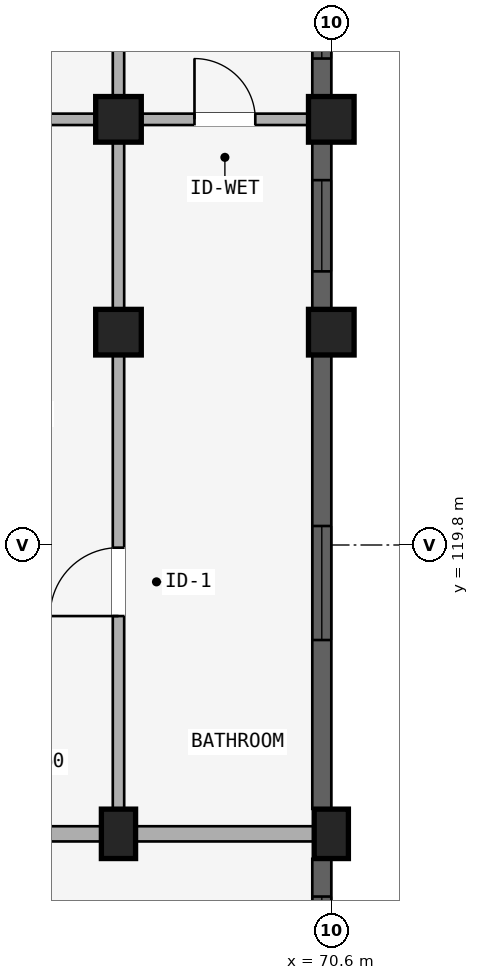
"""IFC4 building model, lengths in metres.
Left out: names, types, materials, properties, quantities, classifications, styles, units other than length and angle.
Written with IfcOpenShell. Run it as: python <this file> out.ifc"""

import sys

from ifc_helpers import new_model, si_unit, direction, frame, frame_2d, origin, origin_2d, place, context, subcontext, project, spatial, rectangle, extrude, element, fill, save


model = new_model("IFC4")
c1 = context("Model", 3, precision=1e-05, world=origin(), true_north=direction((0.0, 1.0)))
c2 = subcontext(c1, "Body", "Model", "MODEL_VIEW")
j1 = project(units=[si_unit("LENGTHUNIT", "METRE"), si_unit("PLANEANGLEUNIT", "RADIAN")], contexts=[c1])
p1 = place(None, origin())
s1 = spatial("IfcSite", under=j1, at=p1, CompositionType="ELEMENT")
p2 = place(p1, origin())
s2 = spatial("IfcBuilding", under=s1, at=p2, CompositionType="ELEMENT")
p3 = place(p2, frame((0.0, 0.0, 33.9)))
s3 = spatial("IfcBuildingStorey", under=s2, at=p3, CompositionType="ELEMENT", Elevation=33.9)
p4 = place(p3, frame((67.8, 116.0, 0.0), z_axis=(0.0, 0.0, 1.0), x_axis=(1.0, 0.0, 0.0)))
e1 = element("IfcColumn", 1, at=p4, inside=s3, PredefinedType="COLUMN", context=c2, shape_type="SweptSolid", body=[
    extrude(rectangle(XDim=0.45, YDim=0.65, at=origin_2d()), origin(), (0.0, 0.0, 1.0), 2.93),
])
for number, where, z_axis, x_axis in (
    (2, (67.8, 122.6, 0.0), (0.0, 0.0, 1.0), (1.0, 0.0, 0.0)),
    (3, (67.8, 125.4, 0.0), (0.0, 0.0, 1.0), (1.0, 0.0, 0.0)),
):
    element("IfcColumn", number, at=place(p3, frame(where, z_axis=z_axis, x_axis=x_axis)), inside=s3, PredefinedType="COLUMN", context=c2, shape_type="SweptSolid", body=[
        extrude(rectangle(XDim=0.6, YDim=0.6, at=origin_2d()), origin(), (0.0, 0.0, 1.0), 2.93),
    ])
p5 = place(p3, frame((70.6, 116.0, 0.0), z_axis=(0.0, 0.0, 1.0), x_axis=(1.0, 0.0, 0.0)))
e4 = element("IfcColumn", 4, at=p5, inside=s3, PredefinedType="COLUMN", context=c2, shape_type="SweptSolid", body=[
    extrude(rectangle(XDim=0.45, YDim=0.65, at=origin_2d()), origin(), (0.0, 0.0, 1.0), 2.93),
])
for number, where, z_axis, x_axis in (
    (5, (70.6, 122.6, 0.0), (0.0, 0.0, 1.0), (1.0, 0.0, 0.0)),
    (6, (70.6, 125.4, 0.0), (0.0, 0.0, 1.0), (1.0, 0.0, 0.0)),
):
    element("IfcColumn", number, at=place(p3, frame(where, z_axis=z_axis, x_axis=x_axis)), inside=s3, PredefinedType="COLUMN", context=c2, shape_type="SweptSolid", body=[
        extrude(rectangle(XDim=0.6, YDim=0.6, at=origin_2d()), origin(), (0.0, 0.0, 1.0), 2.93),
    ])
p6 = place(p3, frame((65.0, 116.0, 0.0), z_axis=(0.0, 0.0, 1.0), x_axis=(1.0, 0.0, 0.0)))
e7 = element("IfcWall", 7, at=p6, inside=s3, PredefinedType="STANDARD", context=c2, shape_type="SweptSolid", body=[
    extrude(rectangle(XDim=2.8, YDim=0.2, at=frame_2d((1.4, 0.0))), origin(), (0.0, 0.0, 1.0), 2.372),
])
p7 = place(p6, frame((0.9, 0.0, 0.0)))
e8 = element("IfcOpeningElement", 8, at=p7, cuts=e7, PredefinedType="OPENING", context=c2, shape_type="SweptSolid", body=[
    extrude(rectangle(XDim=1.0, YDim=2.15, at=frame_2d((0.5, 1.075))), frame((0.0, 0.11, 0.0), z_axis=(0.0, -1.0, 0.0), x_axis=(1.0, 0.0, 0.0)), (0.0, 0.0, 1.0), 0.22),
])
p8 = place(p3, frame((65.08, 125.4, 0.0), z_axis=(0.0, 0.0, 1.0), x_axis=(1.0, 0.0, 0.0)))
e9 = element("IfcWall", 9, at=p8, inside=s3, PredefinedType="PLUMBINGWALL", context=c2, shape_type="SweptSolid", body=[
    extrude(rectangle(XDim=2.64, YDim=0.15, at=frame_2d((1.32, 0.0))), origin(), (0.0, 0.0, 1.0), 2.372),
])
p9 = place(p8, frame((0.87, 0.0, 0.0)))
e10 = element("IfcOpeningElement", 10, at=p9, cuts=e9, PredefinedType="OPENING", context=c2, shape_type="SweptSolid", body=[
    extrude(rectangle(XDim=0.9, YDim=2.1, at=frame_2d((0.45, 1.05))), frame((0.0, 0.085, 0.0), z_axis=(0.0, -1.0, 0.0), x_axis=(1.0, 0.0, 0.0)), (0.0, 0.0, 1.0), 0.17),
])
p10 = place(p3, frame((67.8, 116.0, 0.0), z_axis=(0.0, 0.0, 1.0), x_axis=(1.0, 0.0, 0.0)))
e11 = element("IfcWall", 11, at=p10, inside=s3, PredefinedType="STANDARD", context=c2, shape_type="SweptSolid", body=[
    extrude(rectangle(XDim=2.8, YDim=0.2, at=frame_2d((1.4, 0.0))), origin(), (0.0, 0.0, 1.0), 2.372),
])
p11 = place(p3, frame((67.88, 125.4, 0.0), z_axis=(0.0, 0.0, 1.0), x_axis=(1.0, 0.0, 0.0)))
e12 = element("IfcWall", 12, at=p11, inside=s3, PredefinedType="PLUMBINGWALL", context=c2, shape_type="SweptSolid", body=[
    extrude(rectangle(XDim=2.64, YDim=0.15, at=frame_2d((1.32, 0.0))), origin(), (0.0, 0.0, 1.0), 2.372),
])
p12 = place(p11, frame((0.92, 0.0, 0.0)))
e13 = element("IfcOpeningElement", 13, at=p12, cuts=e12, PredefinedType="OPENING", context=c2, shape_type="SweptSolid", body=[
    extrude(rectangle(XDim=0.8, YDim=2.1, at=frame_2d((0.4, 1.05))), frame((0.0, 0.085, 0.0), z_axis=(0.0, -1.0, 0.0), x_axis=(1.0, 0.0, 0.0)), (0.0, 0.0, 1.0), 0.17),
])
p13 = place(p3, frame((67.8, 116.05, 0.0), z_axis=(0.0, 0.0, 1.0), x_axis=(0.0, 1.0, 0.0)))
e14 = element("IfcWall", 14, at=p13, inside=s3, PredefinedType="PARTITIONING", context=c2, shape_type="SweptSolid", body=[
    extrude(rectangle(XDim=6.53, YDim=0.15, at=frame_2d((3.265, 0.0))), origin(), (0.0, 0.0, 1.0), 2.372),
])
p14 = place(p13, frame((2.815, 0.0, 0.0)))
e15 = element("IfcOpeningElement", 15, at=p14, cuts=e14, PredefinedType="OPENING", context=c2, shape_type="SweptSolid", body=[
    extrude(rectangle(XDim=0.9, YDim=2.1, at=frame_2d((0.45, 1.05))), frame((0.0, 0.085, 0.0), z_axis=(0.0, -1.0, 0.0), x_axis=(1.0, 0.0, 0.0)), (0.0, 0.0, 1.0), 0.17),
])
p15 = place(p3, frame((67.8, 122.7, 0.0), z_axis=(0.0, 0.0, 1.0), x_axis=(0.0, 1.0, 0.0)))
e16 = element("IfcWall", 16, at=p15, inside=s3, PredefinedType="PARTITIONING", context=c2, shape_type="SweptSolid", body=[
    extrude(rectangle(XDim=10.82, YDim=0.15, at=frame_2d((5.41, 0.0))), origin(), (0.0, 0.0, 1.0), 2.372),
])
p16 = place(p15, frame((3.7, 0.0, 0.0)))
e17 = element("IfcOpeningElement", 17, at=p16, cuts=e16, PredefinedType="OPENING", context=c2, shape_type="SweptSolid", body=[
    extrude(rectangle(XDim=0.8, YDim=2.1, at=frame_2d((0.4, 1.05))), frame((0.0, 0.085, 0.0), z_axis=(0.0, -1.0, 0.0), x_axis=(1.0, 0.0, 0.0)), (0.0, 0.0, 1.0), 0.17),
])
p17 = place(p3, frame((70.475, 113.928, 0.0), z_axis=(0.0, 0.0, 1.0), x_axis=(0.0, 1.0, 0.0)))
e18 = element("IfcWall", 18, at=p17, inside=s3, PredefinedType="STANDARD", context=c2, shape_type="SweptSolid", body=[
    extrude(rectangle(XDim=1.743, YDim=0.25, at=frame_2d((0.872, 0.0))), origin(), (0.0, 0.0, 1.0), 2.372),
])
p18 = place(p17, frame((0.497, 0.0, 0.88)))
e19 = element("IfcOpeningElement", 19, at=p18, cuts=e18, PredefinedType="OPENING", context=c2, shape_type="SweptSolid", body=[
    extrude(rectangle(XDim=0.75, YDim=1.05, at=frame_2d((0.375, 0.525))), frame((0.0, 0.135, 0.0), z_axis=(0.0, -1.0, 0.0), x_axis=(1.0, 0.0, 0.0)), (0.0, 0.0, 1.0), 0.27),
])
p19 = place(p3, frame((70.475, 116.329, 0.0), z_axis=(0.0, 0.0, 1.0), x_axis=(0.0, 1.0, 0.0)))
e20 = element("IfcWall", 20, at=p19, inside=s3, PredefinedType="STANDARD", context=c2, shape_type="SweptSolid", body=[
    extrude(rectangle(XDim=5.968, YDim=0.25, at=frame_2d((2.984, 0.0))), origin(), (0.0, 0.0, 1.0), 2.372),
])
p20 = place(p19, frame((2.221, 0.0, 0.522)))
e21 = element("IfcOpeningElement", 21, at=p20, cuts=e20, PredefinedType="OPENING", context=c2, shape_type="SweptSolid", body=[
    extrude(rectangle(XDim=1.5, YDim=1.65, at=frame_2d((0.75, 0.825))), frame((0.0, 0.135, 0.0), z_axis=(0.0, -1.0, 0.0), x_axis=(1.0, 0.0, 0.0)), (0.0, 0.0, 1.0), 0.27),
])
p21 = place(p3, frame((70.475, 122.904, 0.0), z_axis=(0.0, 0.0, 1.0), x_axis=(0.0, 1.0, 0.0)))
e22 = element("IfcWall", 22, at=p21, inside=s3, PredefinedType="STANDARD", context=c2, shape_type="SweptSolid", body=[
    extrude(rectangle(XDim=2.193, YDim=0.25, at=frame_2d((1.096, 0.0))), origin(), (0.0, 0.0, 1.0), 2.372),
])
p22 = place(p21, frame((0.497, 0.0, 0.672)))
e23 = element("IfcOpeningElement", 23, at=p22, cuts=e22, PredefinedType="OPENING", context=c2, shape_type="SweptSolid", body=[
    extrude(rectangle(XDim=1.2, YDim=1.5, at=frame_2d((0.6, 0.75))), frame((0.0, 0.135, 0.0), z_axis=(0.0, -1.0, 0.0), x_axis=(1.0, 0.0, 0.0)), (0.0, 0.0, 1.0), 0.27),
])
p23 = place(p3, frame((70.475, 125.704, 0.0), z_axis=(0.0, 0.0, 1.0), x_axis=(0.0, 1.0, 0.0)))
e24 = element("IfcWall", 24, at=p23, inside=s3, PredefinedType="STANDARD", context=c2, shape_type="SweptSolid", body=[
    extrude(rectangle(XDim=2.193, YDim=0.25, at=frame_2d((1.096, 0.0))), origin(), (0.0, 0.0, 1.0), 2.372),
])
p24 = place(p23, frame((0.497, 0.0, 0.672)))
e25 = element("IfcOpeningElement", 25, at=p24, cuts=e24, PredefinedType="OPENING", context=c2, shape_type="SweptSolid", body=[
    extrude(rectangle(XDim=1.2, YDim=1.5, at=frame_2d((0.6, 0.75))), frame((0.0, 0.135, 0.0), z_axis=(0.0, -1.0, 0.0), x_axis=(1.0, 0.0, 0.0)), (0.0, 0.0, 1.0), 0.27),
])
p25 = place(p18, origin())
e26 = element("IfcWindow", 26, at=p25, inside=s3, PartitioningType="SINGLE_PANEL", PredefinedType="WINDOW", context=c2, shape_type="SweptSolid", body=[
    extrude(rectangle(XDim=0.75, YDim=1.05, at=frame_2d((0.375, 0.525))), frame((0.0, 0.03, 0.0), z_axis=(0.0, -1.0, 0.0), x_axis=(1.0, 0.0, 0.0)), (0.0, 0.0, 1.0), 0.06),
])
fill(e19, e26)
p26 = place(p20, origin())
e27 = element("IfcWindow", 27, at=p26, inside=s3, PartitioningType="DOUBLE_PANEL_VERTICAL", PredefinedType="WINDOW", context=c2, shape_type="SweptSolid", body=[
    extrude(rectangle(XDim=1.5, YDim=1.65, at=frame_2d((0.75, 0.825))), frame((0.0, 0.03, 0.0), z_axis=(0.0, -1.0, 0.0), x_axis=(1.0, 0.0, 0.0)), (0.0, 0.0, 1.0), 0.06),
])
fill(e21, e27)
p27 = place(p22, origin())
e28 = element("IfcWindow", 28, at=p27, inside=s3, PartitioningType="SINGLE_PANEL", PredefinedType="WINDOW", context=c2, shape_type="SweptSolid", body=[
    extrude(rectangle(XDim=1.2, YDim=1.5, at=frame_2d((0.6, 0.75))), frame((0.0, 0.03, 0.0), z_axis=(0.0, -1.0, 0.0), x_axis=(1.0, 0.0, 0.0)), (0.0, 0.0, 1.0), 0.06),
])
fill(e23, e28)
p28 = place(p24, origin())
e29 = element("IfcWindow", 29, at=p28, inside=s3, PartitioningType="SINGLE_PANEL", PredefinedType="WINDOW", context=c2, shape_type="SweptSolid", body=[
    extrude(rectangle(XDim=1.2, YDim=1.5, at=frame_2d((0.6, 0.75))), frame((0.0, 0.03, 0.0), z_axis=(0.0, -1.0, 0.0), x_axis=(1.0, 0.0, 0.0)), (0.0, 0.0, 1.0), 0.06),
])
fill(e25, e29)
p29 = place(p12, origin())
e30 = element("IfcDoor", 30, at=p29, inside=s3, OperationType="SINGLE_SWING_LEFT", PredefinedType="DOOR", context=c2, shape_type="SweptSolid", body=[
    extrude(rectangle(XDim=0.8, YDim=2.1, at=frame_2d((0.4, 1.05))), frame((0.0, 0.025, 0.0), z_axis=(0.0, -1.0, 0.0), x_axis=(1.0, 0.0, 0.0)), (0.0, 0.0, 1.0), 0.05),
])
fill(e13, e30)
p30 = place(p14, origin())
e31 = element("IfcDoor", 31, at=p30, inside=s3, OperationType="SINGLE_SWING_LEFT", PredefinedType="DOOR", context=c2, shape_type="SweptSolid", body=[
    extrude(rectangle(XDim=0.9, YDim=2.1, at=frame_2d((0.45, 1.05))), frame((0.0, 0.025, 0.0), z_axis=(0.0, -1.0, 0.0), x_axis=(1.0, 0.0, 0.0)), (0.0, 0.0, 1.0), 0.05),
])
fill(e15, e31)
save(model, sys.argv[1])
